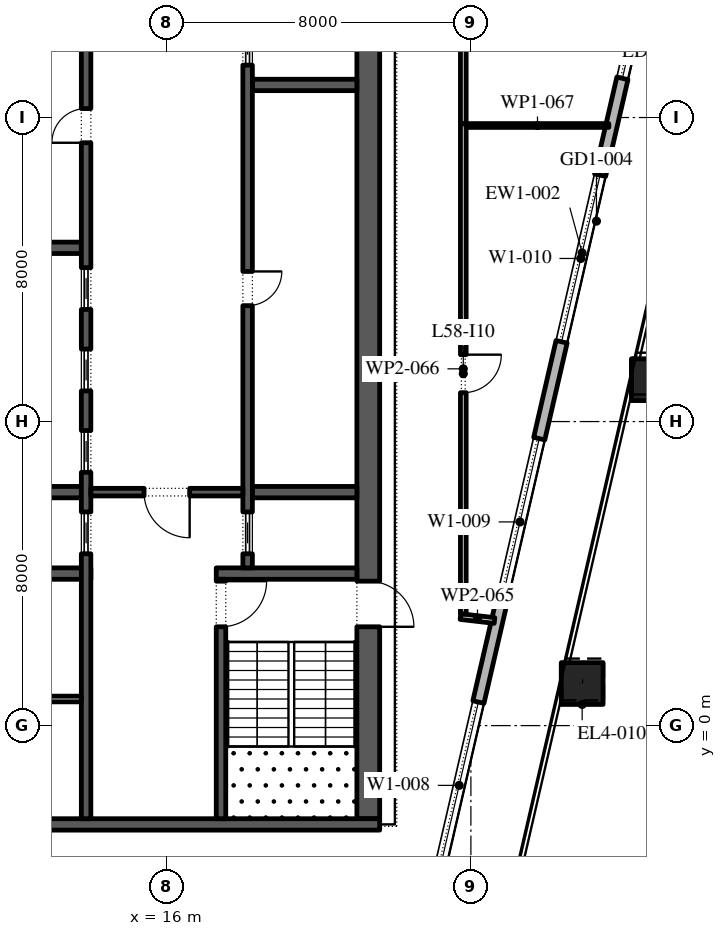
"""IFC4 building model, lengths in metres.
Left out: names, types, materials, properties, quantities, classifications, styles, units other than length and angle.
Written with IfcOpenShell. Run it as: python <this file> out.ifc"""

import sys

from ifc_helpers import new_model, si_unit, direction, frame, frame_2d, origin, origin_2d, place, context, subcontext, project, spatial, rectangle, extrude, element, fill, save


model = new_model("IFC4")
c1 = context("Model", 3, precision=1e-05, world=origin(), true_north=direction((0.0, 1.0)))
c2 = subcontext(c1, "Body", "Model", "MODEL_VIEW")
j1 = project(units=[si_unit("LENGTHUNIT", "METRE"), si_unit("PLANEANGLEUNIT", "RADIAN")], contexts=[c1])
p1 = place(None, origin())
s1 = spatial("IfcSite", under=j1, at=p1, CompositionType="ELEMENT")
p2 = place(p1, origin())
s2 = spatial("IfcBuilding", under=s1, at=p2, CompositionType="ELEMENT")
p3 = place(p2, frame((0.0, 0.0, 268.2)))
s3 = spatial("IfcBuildingStorey", under=s2, at=p3, CompositionType="ELEMENT", Elevation=268.2)
p4 = place(p3, frame((26.927, 1.107, 0.0), z_axis=(0.005869091843, 0.025277771797, 0.999663237302), x_axis=(-0.974088391429, 0.226167649504, 0.0)))
e1 = element("IfcColumn", 1, at=p4, inside=s3, PredefinedType="COLUMN", context=c2, shape_type="SweptSolid", body=[
    extrude(rectangle(XDim=1.1, YDim=1.1, at=origin_2d()), origin(), (0.0, 0.0, 1.0), 4.201),
])
p5 = place(p3, frame((28.773, 9.102, 0.0), z_axis=(0.008770865357, 0.037987721479, 0.999239713451), x_axis=(-0.97436607968, 0.224968315033, 0.0)))
e2 = element("IfcColumn", 2, at=p5, inside=s3, PredefinedType="COLUMN", context=c2, shape_type="SweptSolid", body=[
    extrude(rectangle(XDim=1.1, YDim=1.1, at=origin_2d()), origin(), (0.0, 0.0, 1.0), 4.203),
])
p6 = place(p3, frame((21.359, -11.678, 0.0), z_axis=(0.0, 0.0, 1.0), x_axis=(0.224949198343, 0.974370493275, 0.0)))
e3 = element("IfcWall", 3, at=p6, inside=s3, PredefinedType="STANDARD", context=c2, shape_type="SweptSolid", body=[
    extrude(rectangle(XDim=49.5, YDim=0.3, at=frame_2d((24.75, 0.0))), origin(), (0.0, 0.0, 1.0), 4.0),
])
p7 = place(p6, frame((1.157, 0.0, 0.45)))
e4 = element("IfcOpeningElement", 4, at=p7, cuts=e3, PredefinedType="OPENING", context=c2, shape_type="SweptSolid", body=[
    extrude(rectangle(XDim=4.5, YDim=3.05, at=frame_2d((2.25, 1.525))), frame((0.0, 0.16, 0.0), z_axis=(0.0, -1.0, 0.0), x_axis=(1.0, 0.0, 0.0)), (0.0, 0.0, 1.0), 0.32),
])
p8 = place(p6, frame((8.121, 0.0, 0.45)))
e5 = element("IfcOpeningElement", 5, at=p8, cuts=e3, PredefinedType="OPENING", context=c2, shape_type="SweptSolid", body=[
    extrude(rectangle(XDim=4.5, YDim=3.05, at=frame_2d((2.25, 1.525))), frame((0.0, 0.16, 0.0), z_axis=(0.0, -1.0, 0.0), x_axis=(1.0, 0.0, 0.0)), (0.0, 0.0, 1.0), 0.32),
])
p9 = place(p6, frame((15.236, 0.0, 0.45)))
e6 = element("IfcOpeningElement", 6, at=p9, cuts=e3, PredefinedType="OPENING", context=c2, shape_type="SweptSolid", body=[
    extrude(rectangle(XDim=4.5, YDim=3.05, at=frame_2d((2.25, 1.525))), frame((0.0, 0.16, 0.0), z_axis=(0.0, -1.0, 0.0), x_axis=(1.0, 0.0, 0.0)), (0.0, 0.0, 1.0), 0.32),
])
p10 = place(p6, frame((22.35, 0.0, 0.45)))
e7 = element("IfcOpeningElement", 7, at=p10, cuts=e3, PredefinedType="OPENING", context=c2, shape_type="SweptSolid", body=[
    extrude(rectangle(XDim=4.5, YDim=3.05, at=frame_2d((2.25, 1.525))), frame((0.0, 0.16, 0.0), z_axis=(0.0, -1.0, 0.0), x_axis=(1.0, 0.0, 0.0)), (0.0, 0.0, 1.0), 0.32),
])
p11 = place(p6, frame((29.464, 0.0, 0.45)))
e8 = element("IfcOpeningElement", 8, at=p11, cuts=e3, PredefinedType="OPENING", context=c2, shape_type="SweptSolid", body=[
    extrude(rectangle(XDim=4.5, YDim=2.95, at=frame_2d((2.25, 1.475))), frame((0.0, 0.16, 0.0), z_axis=(0.0, -1.0, 0.0), x_axis=(1.0, 0.0, 0.0)), (0.0, 0.0, 1.0), 0.32),
])
p12 = place(p6, frame((37.628, 0.0, 0.0)))
e9 = element("IfcOpeningElement", 9, at=p12, cuts=e3, PredefinedType="OPENING", context=c2, shape_type="SweptSolid", body=[
    extrude(rectangle(XDim=2.4, YDim=3.325, at=frame_2d((1.2, 1.663))), frame((0.0, 0.16, 0.0), z_axis=(0.0, -1.0, 0.0), x_axis=(1.0, 0.0, 0.0)), (0.0, 0.0, 1.0), 0.32),
])
p13 = place(p6, frame((43.693, 0.0, 0.45)))
e10 = element("IfcOpeningElement", 10, at=p13, cuts=e3, PredefinedType="OPENING", context=c2, shape_type="SweptSolid", body=[
    extrude(rectangle(XDim=4.5, YDim=3.05, at=frame_2d((2.25, 1.525))), frame((0.0, 0.16, 0.0), z_axis=(0.0, -1.0, 0.0), x_axis=(1.0, 0.0, 0.0)), (0.0, 0.0, 1.0), 0.32),
])
p14 = place(p3, frame((21.3, -2.45, 0.0), z_axis=(0.0, 0.0, 1.0), x_axis=(0.0, 1.0, 0.0)))
e11 = element("IfcWall", 11, at=p14, inside=s3, PredefinedType="SHEAR", context=c2, shape_type="SweptSolid", body=[
    extrude(rectangle(XDim=27.9, YDim=0.6, at=frame_2d((13.95, 0.0))), origin(), (0.0, 0.0, 1.0), 4.0),
])
p15 = place(p14, frame((5.05, 0.0, 0.0)))
e12 = element("IfcOpeningElement", 12, at=p15, cuts=e11, PredefinedType="OPENING", context=c2, shape_type="SweptSolid", body=[
    extrude(rectangle(XDim=1.2, YDim=2.1, at=frame_2d((0.6, 1.05))), frame((0.0, 0.31, 0.0), z_axis=(0.0, -1.0, 0.0), x_axis=(1.0, 0.0, 0.0)), (0.0, 0.0, 1.0), 0.62),
])
p16 = place(p14, frame((21.65, 0.0, 0.0)))
e13 = element("IfcOpeningElement", 13, at=p16, cuts=e11, PredefinedType="OPENING", context=c2, shape_type="SweptSolid", body=[
    extrude(rectangle(XDim=1.2, YDim=2.1, at=frame_2d((0.6, 1.05))), frame((0.0, 0.31, 0.0), z_axis=(0.0, -1.0, 0.0), x_axis=(1.0, 0.0, 0.0)), (0.0, 0.0, 1.0), 0.62),
])
p17 = place(p3, frame((10.4, -2.6, 0.0), z_axis=(0.0, 0.0, 1.0), x_axis=(1.0, 0.0, 0.0)))
e14 = element("IfcWall", 14, at=p17, inside=s3, PredefinedType="SHEAR", context=c2, shape_type="SweptSolid", body=[
    extrude(rectangle(XDim=11.2, YDim=0.3, at=frame_2d((5.6, 0.0))), origin(), (0.0, 0.0, 1.0), 4.0),
])
p18 = place(p3, frame((17.3, 4.0, 0.0), z_axis=(0.0, 0.0, 1.0), x_axis=(1.0, 0.0, 0.0)))
e15 = element("IfcWall", 15, at=p18, inside=s3, PredefinedType="SHEAR", context=c2, shape_type="SweptSolid", body=[
    extrude(rectangle(XDim=3.7, YDim=0.3, at=frame_2d((1.85, 0.0))), origin(), (0.0, 0.0, 1.0), 4.0),
])
p19 = place(p3, frame((17.425, -2.45, 0.0), z_axis=(0.0, 0.0, 1.0), x_axis=(0.0, 1.0, 0.0)))
e16 = element("IfcWall", 16, at=p19, inside=s3, PredefinedType="SHEAR", context=c2, shape_type="SweptSolid", body=[
    extrude(rectangle(XDim=6.3, YDim=0.25, at=frame_2d((3.15, 0.0))), origin(), (0.0, 0.0, 1.0), 4.0),
])
p20 = place(p19, frame((5.05, 0.0, 0.0)))
e17 = element("IfcOpeningElement", 17, at=p20, cuts=e16, PredefinedType="OPENING", context=c2, shape_type="SweptSolid", body=[
    extrude(rectangle(XDim=1.2, YDim=2.1, at=frame_2d((0.6, 1.05))), frame((0.0, 0.135, 0.0), z_axis=(0.0, -1.0, 0.0), x_axis=(1.0, 0.0, 0.0)), (0.0, 0.0, 1.0), 0.27),
])
for number, where, z_axis, x_axis in (
    (18, (18.25, 6.143, 0.0), (0.0, 0.0, 1.0), (1.0, 0.0, 0.0)),
    (19, (18.25, 16.857, 0.0), (0.0, 0.0, 1.0), (1.0, 0.0, 0.0)),
):
    element("IfcWall", number, at=place(p3, frame(where, z_axis=z_axis, x_axis=x_axis)), inside=s3, PredefinedType="SHEAR", context=c2, shape_type="SweptSolid", body=[
        extrude(rectangle(XDim=2.75, YDim=0.3, at=frame_2d((1.375, 0.0))), origin(), (0.0, 0.0, 1.0), 4.0),
    ])
p21 = place(p3, frame((18.125, 4.15, 0.0), z_axis=(0.0, 0.0, 1.0), x_axis=(0.0, 1.0, 0.0)))
e20 = element("IfcWall", 20, at=p21, inside=s3, PredefinedType="SHEAR", context=c2, shape_type="SweptSolid", body=[
    extrude(rectangle(XDim=14.7, YDim=0.25, at=frame_2d((7.35, 0.0))), origin(), (0.0, 0.0, 1.0), 4.0),
])
p22 = place(p21, frame((6.9, 0.0, 0.0)))
e21 = element("IfcOpeningElement", 21, at=p22, cuts=e20, PredefinedType="OPENING", context=c2, shape_type="SweptSolid", body=[
    extrude(rectangle(XDim=0.9, YDim=2.1, at=frame_2d((0.45, 1.05))), frame((0.0, 0.135, 0.0), z_axis=(0.0, -1.0, 0.0), x_axis=(1.0, 0.0, 0.0)), (0.0, 0.0, 1.0), 0.27),
])
p23 = place(p21, frame((0.371, 0.0, 0.0)))
e22 = element("IfcOpeningElement", 22, at=p23, cuts=e20, PredefinedType="OPENING", context=c2, shape_type="SweptSolid", body=[
    extrude(rectangle(XDim=1.1, YDim=2.1, at=frame_2d((0.55, 1.05))), frame((0.0, 0.135, 0.0), z_axis=(0.0, -1.0, 0.0), x_axis=(1.0, 0.0, 0.0)), (0.0, 0.0, 1.0), 0.27),
])
p24 = place(p21, frame((13.229, 0.0, 0.0)))
e23 = element("IfcOpeningElement", 23, at=p24, cuts=e20, PredefinedType="OPENING", context=c2, shape_type="SweptSolid", body=[
    extrude(rectangle(XDim=1.1, YDim=2.1, at=frame_2d((0.55, 1.05))), frame((0.0, 0.135, 0.0), z_axis=(0.0, -1.0, 0.0), x_axis=(1.0, 0.0, 0.0)), (0.0, 0.0, 1.0), 0.27),
])
p25 = place(p3, frame((11.0, 4.0, 0.0), z_axis=(0.0, 0.0, 1.0), x_axis=(1.0, 0.0, 0.0)))
e24 = element("IfcWall", 24, at=p25, inside=s3, PredefinedType="SHEAR", context=c2, shape_type="SweptSolid", body=[
    extrude(rectangle(XDim=3.0, YDim=0.3, at=frame_2d((1.5, 0.0))), origin(), (0.0, 0.0, 1.0), 4.0),
])
for number, where, z_axis, x_axis in (
    (25, (11.0, 6.143, 0.0), (0.0, 0.0, 1.0), (1.0, 0.0, 0.0)),
    (26, (11.0, 12.571, 0.0), (0.0, 0.0, 1.0), (1.0, 0.0, 0.0)),
):
    element("IfcWall", number, at=place(p3, frame(where, z_axis=z_axis, x_axis=x_axis)), inside=s3, PredefinedType="SHEAR", context=c2, shape_type="SweptSolid", body=[
        extrude(rectangle(XDim=2.75, YDim=0.3, at=frame_2d((1.375, 0.0))), origin(), (0.0, 0.0, 1.0), 4.0),
    ])
p26 = place(p3, frame((13.875, -2.45, 0.0), z_axis=(0.0, 0.0, 1.0), x_axis=(0.0, 1.0, 0.0)))
e27 = element("IfcWall", 27, at=p26, inside=s3, PredefinedType="SHEAR", context=c2, shape_type="SweptSolid", body=[
    extrude(rectangle(XDim=21.3, YDim=0.25, at=frame_2d((10.65, 0.0))), origin(), (0.0, 0.0, 1.0), 4.0),
])
p27 = place(p26, frame((17.786, 0.0, 0.0)))
e28 = element("IfcOpeningElement", 28, at=p27, cuts=e27, PredefinedType="OPENING", context=c2, shape_type="SweptSolid", body=[
    extrude(rectangle(XDim=0.9, YDim=2.1, at=frame_2d((0.45, 1.05))), frame((0.0, 0.135, 0.0), z_axis=(0.0, -1.0, 0.0), x_axis=(1.0, 0.0, 0.0)), (0.0, 0.0, 1.0), 0.27),
])
p28 = place(p26, frame((6.971, 0.0, 0.0)))
e29 = element("IfcOpeningElement", 29, at=p28, cuts=e27, PredefinedType="OPENING", context=c2, shape_type="SweptSolid", body=[
    extrude(rectangle(XDim=1.1, YDim=2.1, at=frame_2d((0.55, 1.05))), frame((0.0, 0.135, 0.0), z_axis=(0.0, -1.0, 0.0), x_axis=(1.0, 0.0, 0.0)), (0.0, 0.0, 1.0), 0.27),
])
p29 = place(p26, frame((9.114, 0.0, 0.0)))
e30 = element("IfcOpeningElement", 30, at=p29, cuts=e27, PredefinedType="OPENING", context=c2, shape_type="SweptSolid", body=[
    extrude(rectangle(XDim=1.1, YDim=2.1, at=frame_2d((0.55, 1.05))), frame((0.0, 0.135, 0.0), z_axis=(0.0, -1.0, 0.0), x_axis=(1.0, 0.0, 0.0)), (0.0, 0.0, 1.0), 0.27),
])
p30 = place(p26, frame((11.257, 0.0, 0.0)))
e31 = element("IfcOpeningElement", 31, at=p30, cuts=e27, PredefinedType="OPENING", context=c2, shape_type="SweptSolid", body=[
    extrude(rectangle(XDim=1.1, YDim=2.1, at=frame_2d((0.55, 1.05))), frame((0.0, 0.135, 0.0), z_axis=(0.0, -1.0, 0.0), x_axis=(1.0, 0.0, 0.0)), (0.0, 0.0, 1.0), 0.27),
])
p31 = place(p26, frame((13.4, 0.0, 0.0)))
e32 = element("IfcOpeningElement", 32, at=p31, cuts=e27, PredefinedType="OPENING", context=c2, shape_type="SweptSolid", body=[
    extrude(rectangle(XDim=1.1, YDim=2.1, at=frame_2d((0.55, 1.05))), frame((0.0, 0.135, 0.0), z_axis=(0.0, -1.0, 0.0), x_axis=(1.0, 0.0, 0.0)), (0.0, 0.0, 1.0), 0.27),
])
p32 = place(p3, frame((14.0, 6.143, 0.0), z_axis=(0.0, 0.0, 1.0), x_axis=(1.0, 0.0, 0.0)))
e33 = element("IfcWall", 33, at=p32, inside=s3, PredefinedType="SHEAR", context=c2, shape_type="SweptSolid", body=[
    extrude(rectangle(XDim=4.0, YDim=0.2, at=frame_2d((2.0, 0.0))), origin(), (0.0, 0.0, 1.0), 4.0),
])
p33 = place(p32, frame((1.4, 0.0, 0.0)))
e34 = element("IfcOpeningElement", 34, at=p33, cuts=e33, PredefinedType="OPENING", context=c2, shape_type="SweptSolid", body=[
    extrude(rectangle(XDim=1.2, YDim=2.1, at=frame_2d((0.6, 1.05))), frame((0.0, 0.11, 0.0), z_axis=(0.0, -1.0, 0.0), x_axis=(1.0, 0.0, 0.0)), (0.0, 0.0, 1.0), 0.22),
])
p34 = place(p3, frame((11.0, 0.7, 0.0), z_axis=(0.0, 0.0, 1.0), x_axis=(1.0, 0.0, 0.0)))
e35 = element("IfcWall", 35, at=p34, inside=s3, PredefinedType="PARTITIONING", context=c2, shape_type="SweptSolid", body=[
    extrude(rectangle(XDim=2.75, YDim=0.15, at=frame_2d((1.375, 0.0))), origin(), (0.0, 0.0, 1.0), 4.0),
])
p35 = place(p3, frame((23.725, 2.869, 0.0), z_axis=(0.0, 0.0, 1.0), x_axis=(0.993330469257, -0.115302119865, 0.0)))
e36 = element("IfcWall", 36, at=p35, inside=s3, PredefinedType="PARTITIONING", context=c2, shape_type="SweptSolid", body=[
    extrude(rectangle(XDim=0.902, YDim=0.15, at=frame_2d((0.451, 0.0))), origin(), (0.0, 0.0, 1.0), 4.0),
])
p36 = place(p3, frame((23.8, 15.84, 0.0), z_axis=(0.0, 0.0, 1.0), x_axis=(0.0, -1.0, 0.0)))
e37 = element("IfcWall", 37, at=p36, inside=s3, PredefinedType="PARTITIONING", context=c2, shape_type="SweptSolid", body=[
    extrude(rectangle(XDim=12.905, YDim=0.15, at=frame_2d((6.453, 0.0))), origin(), (0.0, 0.0, 1.0), 4.0),
])
p37 = place(p36, frame((6.08, 0.0, 0.0)))
e38 = element("IfcOpeningElement", 38, at=p37, cuts=e37, PredefinedType="OPENING", context=c2, shape_type="SweptSolid", body=[
    extrude(rectangle(XDim=1.0, YDim=2.1, at=frame_2d((0.5, 1.05))), frame((0.0, 0.085, 0.0), z_axis=(0.0, -1.0, 0.0), x_axis=(1.0, 0.0, 0.0)), (0.0, 0.0, 1.0), 0.17),
])
p38 = place(p3, frame((23.875, 15.79, 0.0), z_axis=(0.0, 0.0, 1.0), x_axis=(1.0, 0.0, 0.0)))
e39 = element("IfcWall", 39, at=p38, inside=s3, PredefinedType="PARTITIONING", context=c2, shape_type="SweptSolid", body=[
    extrude(rectangle(XDim=3.754, YDim=0.1, at=frame_2d((1.877, 0.0))), origin(), (0.0, 0.0, 1.0), 4.0),
])
p39 = place(p3, frame((23.8, 28.19, 0.0), z_axis=(0.0, 0.0, 1.0), x_axis=(0.0, -1.0, 0.0)))
e40 = element("IfcWall", 40, at=p39, inside=s3, PredefinedType="PARTITIONING", context=c2, shape_type="SweptSolid", body=[
    extrude(rectangle(XDim=12.35, YDim=0.15, at=frame_2d((6.175, 0.0))), origin(), (0.0, 0.0, 1.0), 4.0),
])
p40 = place(p39, frame((8.25, 0.0, 0.0)))
e41 = element("IfcOpeningElement", 41, at=p40, cuts=e40, PredefinedType="OPENING", context=c2, shape_type="SweptSolid", body=[
    extrude(rectangle(XDim=1.0, YDim=2.1, at=frame_2d((0.5, 1.05))), frame((0.0, 0.085, 0.0), z_axis=(0.0, -1.0, 0.0), x_axis=(1.0, 0.0, 0.0)), (0.0, 0.0, 1.0), 0.17),
])
p41 = place(p8, origin())
e42 = element("IfcWindow", 42, at=p41, inside=s3, PartitioningType="DOUBLE_PANEL_VERTICAL", PredefinedType="WINDOW", context=c2, shape_type="SweptSolid", body=[
    extrude(rectangle(XDim=4.5, YDim=3.05, at=frame_2d((2.25, 1.525))), frame((0.0, 0.03, 0.0), z_axis=(0.0, -1.0, 0.0), x_axis=(1.0, 0.0, 0.0)), (0.0, 0.0, 1.0), 0.06),
])
fill(e5, e42)
p42 = place(p9, origin())
e43 = element("IfcWindow", 43, at=p42, inside=s3, PartitioningType="DOUBLE_PANEL_VERTICAL", PredefinedType="WINDOW", context=c2, shape_type="SweptSolid", body=[
    extrude(rectangle(XDim=4.5, YDim=3.05, at=frame_2d((2.25, 1.525))), frame((0.0, 0.03, 0.0), z_axis=(0.0, -1.0, 0.0), x_axis=(1.0, 0.0, 0.0)), (0.0, 0.0, 1.0), 0.06),
])
fill(e6, e43)
p43 = place(p10, origin())
e44 = element("IfcWindow", 44, at=p43, inside=s3, PartitioningType="DOUBLE_PANEL_VERTICAL", PredefinedType="WINDOW", context=c2, shape_type="SweptSolid", body=[
    extrude(rectangle(XDim=4.5, YDim=3.05, at=frame_2d((2.25, 1.525))), frame((0.0, 0.03, 0.0), z_axis=(0.0, -1.0, 0.0), x_axis=(1.0, 0.0, 0.0)), (0.0, 0.0, 1.0), 0.06),
])
fill(e7, e44)
p44 = place(p11, origin())
e45 = element("IfcWindow", 45, at=p44, inside=s3, PartitioningType="DOUBLE_PANEL_VERTICAL", PredefinedType="WINDOW", context=c2, shape_type="SweptSolid", body=[
    extrude(rectangle(XDim=4.5, YDim=2.95, at=frame_2d((2.25, 1.475))), frame((0.0, 0.03, 0.0), z_axis=(0.0, -1.0, 0.0), x_axis=(1.0, 0.0, 0.0)), (0.0, 0.0, 1.0), 0.06),
])
fill(e8, e45)
p45 = place(p22, frame((0.9, -0.2, 0.0), z_axis=(0.0, 0.0, 1.0), x_axis=(-1.0, 0.0, 0.0)))
e46 = element("IfcDoor", 46, at=p45, inside=s3, OperationType="SINGLE_SWING_RIGHT", PredefinedType="DOOR", context=c2, shape_type="SweptSolid", body=[
    extrude(rectangle(XDim=0.9, YDim=2.1, at=frame_2d((0.45, 1.05))), frame((0.0, -0.075, 0.0), z_axis=(0.0, -1.0, 0.0), x_axis=(1.0, 0.0, 0.0)), (0.0, 0.0, 1.0), 0.05),
])
fill(e21, e46)
p46 = place(p23, origin())
e47 = element("IfcDoor", 47, at=p46, inside=s3, OperationType="SLIDING_TO_LEFT", PredefinedType="DOOR", context=c2, shape_type="SweptSolid", body=[
    extrude(rectangle(XDim=1.1, YDim=2.1, at=frame_2d((0.55, 1.05))), frame((0.0, 0.025, 0.0), z_axis=(0.0, -1.0, 0.0), x_axis=(1.0, 0.0, 0.0)), (0.0, 0.0, 1.0), 0.05),
])
fill(e22, e47)
p47 = place(p24, origin())
e48 = element("IfcDoor", 48, at=p47, inside=s3, OperationType="SLIDING_TO_LEFT", PredefinedType="DOOR", context=c2, shape_type="SweptSolid", body=[
    extrude(rectangle(XDim=1.1, YDim=2.1, at=frame_2d((0.55, 1.05))), frame((0.0, 0.025, 0.0), z_axis=(0.0, -1.0, 0.0), x_axis=(1.0, 0.0, 0.0)), (0.0, 0.0, 1.0), 0.05),
])
fill(e23, e48)
p48 = place(p27, origin())
e49 = element("IfcDoor", 49, at=p48, inside=s3, OperationType="SINGLE_SWING_RIGHT", PredefinedType="DOOR", context=c2, shape_type="SweptSolid", body=[
    extrude(rectangle(XDim=0.9, YDim=2.1, at=frame_2d((0.45, 1.05))), frame((0.0, 0.125, 0.0), z_axis=(0.0, -1.0, 0.0), x_axis=(1.0, 0.0, 0.0)), (0.0, 0.0, 1.0), 0.05),
])
fill(e28, e49)
p49 = place(p28, origin())
e50 = element("IfcDoor", 50, at=p49, inside=s3, OperationType="SLIDING_TO_LEFT", PredefinedType="DOOR", context=c2, shape_type="SweptSolid", body=[
    extrude(rectangle(XDim=1.1, YDim=2.1, at=frame_2d((0.55, 1.05))), frame((0.0, 0.025, 0.0), z_axis=(0.0, -1.0, 0.0), x_axis=(1.0, 0.0, 0.0)), (0.0, 0.0, 1.0), 0.05),
])
fill(e29, e50)
p50 = place(p29, origin())
e51 = element("IfcDoor", 51, at=p50, inside=s3, OperationType="SLIDING_TO_LEFT", PredefinedType="DOOR", context=c2, shape_type="SweptSolid", body=[
    extrude(rectangle(XDim=1.1, YDim=2.1, at=frame_2d((0.55, 1.05))), frame((0.0, 0.025, 0.0), z_axis=(0.0, -1.0, 0.0), x_axis=(1.0, 0.0, 0.0)), (0.0, 0.0, 1.0), 0.05),
])
fill(e30, e51)
p51 = place(p30, origin())
e52 = element("IfcDoor", 52, at=p51, inside=s3, OperationType="SLIDING_TO_LEFT", PredefinedType="DOOR", context=c2, shape_type="SweptSolid", body=[
    extrude(rectangle(XDim=1.1, YDim=2.1, at=frame_2d((0.55, 1.05))), frame((0.0, 0.025, 0.0), z_axis=(0.0, -1.0, 0.0), x_axis=(1.0, 0.0, 0.0)), (0.0, 0.0, 1.0), 0.05),
])
fill(e31, e52)
p52 = place(p31, origin())
e53 = element("IfcDoor", 53, at=p52, inside=s3, OperationType="SLIDING_TO_LEFT", PredefinedType="DOOR", context=c2, shape_type="SweptSolid", body=[
    extrude(rectangle(XDim=1.1, YDim=2.1, at=frame_2d((0.55, 1.05))), frame((0.0, 0.025, 0.0), z_axis=(0.0, -1.0, 0.0), x_axis=(1.0, 0.0, 0.0)), (0.0, 0.0, 1.0), 0.05),
])
fill(e32, e53)
p53 = place(p33, frame((1.2, 0.0, 0.0), z_axis=(0.0, 0.0, 1.0), x_axis=(-1.0, 0.0, 0.0)))
e54 = element("IfcDoor", 54, at=p53, inside=s3, OperationType="SINGLE_SWING_RIGHT", PredefinedType="DOOR", context=c2, shape_type="SweptSolid", body=[
    extrude(rectangle(XDim=1.2, YDim=2.1, at=frame_2d((0.6, 1.05))), frame((0.0, 0.025, 0.0), z_axis=(0.0, -1.0, 0.0), x_axis=(1.0, 0.0, 0.0)), (0.0, 0.0, 1.0), 0.05),
])
fill(e34, e54)
p54 = place(p20, frame((1.2, 0.0, 0.0), z_axis=(0.0, 0.0, 1.0), x_axis=(-1.0, 0.0, 0.0)))
e55 = element("IfcDoor", 55, at=p54, inside=s3, OperationType="SINGLE_SWING_RIGHT", PredefinedType="DOOR", context=c2, shape_type="SweptSolid", body=[
    extrude(rectangle(XDim=1.2, YDim=2.1, at=frame_2d((0.6, 1.05))), frame((0.0, 0.025, 0.0), z_axis=(0.0, -1.0, 0.0), x_axis=(1.0, 0.0, 0.0)), (0.0, 0.0, 1.0), 0.05),
])
fill(e17, e55)
p55 = place(p15, frame((1.2, 0.0, 0.0), z_axis=(0.0, 0.0, 1.0), x_axis=(-1.0, 0.0, 0.0)))
e56 = element("IfcDoor", 56, at=p55, inside=s3, OperationType="SINGLE_SWING_LEFT", PredefinedType="DOOR", context=c2, shape_type="SweptSolid", body=[
    extrude(rectangle(XDim=1.2, YDim=2.1, at=frame_2d((0.6, 1.05))), frame((0.0, 0.025, 0.0), z_axis=(0.0, -1.0, 0.0), x_axis=(1.0, 0.0, 0.0)), (0.0, 0.0, 1.0), 0.05),
])
fill(e12, e56)
p56 = place(p37, origin())
e57 = element("IfcDoor", 57, at=p56, inside=s3, OperationType="SINGLE_SWING_RIGHT", PredefinedType="DOOR", context=c2, shape_type="SweptSolid", body=[
    extrude(rectangle(XDim=1.0, YDim=2.1, at=frame_2d((0.5, 1.05))), frame((0.0, 0.025, 0.0), z_axis=(0.0, -1.0, 0.0), x_axis=(1.0, 0.0, 0.0)), (0.0, 0.0, 1.0), 0.05),
])
fill(e38, e57)
save(model, sys.argv[1])
